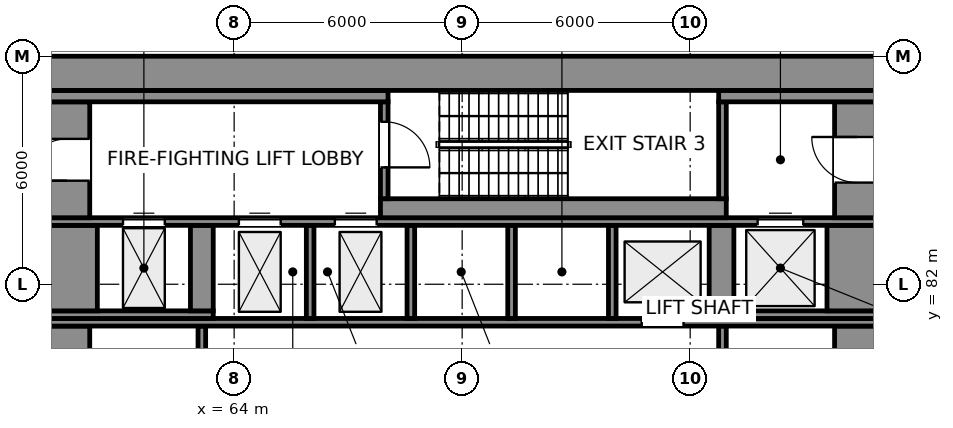
"""IFC4 building model, lengths in metres.
Left out: names, types, materials, properties, quantities, classifications, styles, units other than length and angle.
Written with IfcOpenShell. Run it as: python <this file> out.ifc"""

import sys

from ifc_helpers import new_model, si_unit, direction, frame, frame_2d, origin, place, context, subcontext, project, spatial, rectangle, extrude, element, fill, save


model = new_model("IFC4")
c1 = context("Model", 3, precision=1e-05, world=origin(), true_north=direction((0.0, 1.0)))
c2 = subcontext(c1, "Body", "Model", "MODEL_VIEW")
j1 = project(units=[si_unit("LENGTHUNIT", "METRE"), si_unit("PLANEANGLEUNIT", "RADIAN")], contexts=[c1])
p1 = place(None, origin())
s1 = spatial("IfcSite", under=j1, at=p1, CompositionType="ELEMENT")
p2 = place(p1, origin())
s2 = spatial("IfcBuilding", under=s1, at=p2, CompositionType="ELEMENT")
p3 = place(p2, frame((0.0, 0.0, 34.0)))
s3 = spatial("IfcBuildingStorey", under=s2, at=p3, CompositionType="ELEMENT", Elevation=34.0)
for number, where, z_axis, x_axis in (
    (1, (59.6, 72.2, 0.0), (0.0, 0.0, 1.0), (0.0, 1.0, 0.0)),
    (2, (80.4, 72.2, 0.0), (0.0, 0.0, 1.0), (0.0, 1.0, 0.0)),
):
    element("IfcWall", number, at=place(p3, frame(where, z_axis=z_axis, x_axis=x_axis)), inside=s3, PredefinedType="SHEAR", context=c2, shape_type="SweptSolid", body=[
        extrude(rectangle(XDim=8.7, YDim=1.2, at=frame_2d((4.35, 0.0))), origin(), (0.0, 0.0, 1.0), 5.0),
    ])
for number, where, z_axis, x_axis in (
    (3, (63.15, 77.7, 0.0), (0.0, 0.0, 1.0), (0.0, 1.0, 0.0)),
    (4, (76.85, 77.7, 0.0), (0.0, 0.0, 1.0), (0.0, 1.0, 0.0)),
):
    element("IfcWall", number, at=place(p3, frame(where, z_axis=z_axis, x_axis=x_axis)), inside=s3, PredefinedType="SHEAR", context=c2, shape_type="SweptSolid", body=[
        extrude(rectangle(XDim=3.2, YDim=0.2, at=frame_2d((1.6, 0.0))), origin(), (0.0, 0.0, 1.0), 5.0),
    ])
p4 = place(p3, frame((59.0, 81.0, 0.0), z_axis=(0.0, 0.0, 1.0), x_axis=(1.0, 0.0, 0.0)))
e5 = element("IfcWall", 5, at=p4, inside=s3, PredefinedType="SHEAR", context=c2, shape_type="SweptSolid", body=[
    extrude(rectangle(XDim=22.0, YDim=0.2, at=frame_2d((11.0, 0.0))), origin(), (0.0, 0.0, 1.0), 5.0),
])
p5 = place(p4, frame((15.725, 0.0, 0.0)))
e6 = element("IfcOpeningElement", 6, at=p5, cuts=e5, PredefinedType="OPENING", context=c2, shape_type="SweptSolid", body=[
    extrude(rectangle(XDim=1.1, YDim=2.1, at=frame_2d((0.55, 1.05))), frame((0.0, 0.11, 0.0), z_axis=(0.0, -1.0, 0.0), x_axis=(1.0, 0.0, 0.0)), (0.0, 0.0, 1.0), 0.22),
])
p6 = place(p3, frame((59.0, 81.2, 0.0), z_axis=(0.0, 0.0, 1.0), x_axis=(1.0, 0.0, 0.0)))
e7 = element("IfcWall", 7, at=p6, inside=s3, PredefinedType="SHEAR", context=c2, shape_type="SweptSolid", body=[
    extrude(rectangle(XDim=4.45, YDim=0.2, at=frame_2d((2.225, 0.0))), origin(), (0.0, 0.0, 1.0), 5.0),
])
for number, where, z_axis, x_axis in (
    (8, (66.0, 81.1, 0.0), (0.0, 0.0, 1.0), (0.0, 1.0, 0.0)),
    (9, (68.65, 81.1, 0.0), (0.0, 0.0, 1.0), (0.0, 1.0, 0.0)),
    (10, (71.3, 81.1, 0.0), (0.0, 0.0, 1.0), (0.0, 1.0, 0.0)),
    (11, (73.95, 81.1, 0.0), (0.0, 0.0, 1.0), (0.0, 1.0, 0.0)),
):
    element("IfcWall", number, at=place(p3, frame(where, z_axis=z_axis, x_axis=x_axis)), inside=s3, PredefinedType="SHEAR", context=c2, shape_type="SweptSolid", body=[
        extrude(rectangle(XDim=2.45, YDim=0.2, at=frame_2d((1.225, 0.0))), origin(), (0.0, 0.0, 1.0), 5.0),
    ])
p7 = place(p3, frame((76.5, 81.2, 0.0), z_axis=(0.0, 0.0, 1.0), x_axis=(1.0, 0.0, 0.0)))
e12 = element("IfcWall", 12, at=p7, inside=s3, PredefinedType="SHEAR", context=c2, shape_type="SweptSolid", body=[
    extrude(rectangle(XDim=4.5, YDim=0.2, at=frame_2d((2.25, 0.0))), origin(), (0.0, 0.0, 1.0), 5.0),
])
p8 = place(p3, frame((59.7, 81.3, 0.0), z_axis=(0.0, 0.0, 1.0), x_axis=(0.0, 1.0, 0.0)))
e13 = element("IfcWall", 13, at=p8, inside=s3, PredefinedType="SHEAR", context=c2, shape_type="SweptSolid", body=[
    extrude(rectangle(XDim=2.25, YDim=1.4, at=frame_2d((1.125, 0.0))), origin(), (0.0, 0.0, 1.0), 5.0),
])
p9 = place(p3, frame((63.15, 81.3, 0.0), z_axis=(0.0, 0.0, 1.0), x_axis=(0.0, 1.0, 0.0)))
e14 = element("IfcWall", 14, at=p9, inside=s3, PredefinedType="SHEAR", context=c2, shape_type="SweptSolid", body=[
    extrude(rectangle(XDim=2.25, YDim=0.6, at=frame_2d((1.125, 0.0))), origin(), (0.0, 0.0, 1.0), 5.0),
])
p10 = place(p3, frame((76.825, 81.3, 0.0), z_axis=(0.0, 0.0, 1.0), x_axis=(0.0, 1.0, 0.0)))
e15 = element("IfcWall", 15, at=p10, inside=s3, PredefinedType="SHEAR", context=c2, shape_type="SweptSolid", body=[
    extrude(rectangle(XDim=2.25, YDim=0.65, at=frame_2d((1.125, 0.0))), origin(), (0.0, 0.0, 1.0), 5.0),
])
p11 = place(p3, frame((80.3, 81.3, 0.0), z_axis=(0.0, 0.0, 1.0), x_axis=(0.0, 1.0, 0.0)))
e16 = element("IfcWall", 16, at=p11, inside=s3, PredefinedType="SHEAR", context=c2, shape_type="SweptSolid", body=[
    extrude(rectangle(XDim=2.25, YDim=1.4, at=frame_2d((1.125, 0.0))), origin(), (0.0, 0.0, 1.0), 5.0),
])
p12 = place(p3, frame((59.0, 83.65, 0.0), z_axis=(0.0, 0.0, 1.0), x_axis=(1.0, 0.0, 0.0)))
e17 = element("IfcWall", 17, at=p12, inside=s3, PredefinedType="SHEAR", context=c2, shape_type="SweptSolid", body=[
    extrude(rectangle(XDim=22.0, YDim=0.2, at=frame_2d((11.0, 0.0))), origin(), (0.0, 0.0, 1.0), 5.0),
])
p13 = place(p12, frame((5.125, 0.0, 0.0)))
e18 = element("IfcOpeningElement", 18, at=p13, cuts=e17, PredefinedType="OPENING", context=c2, shape_type="SweptSolid", body=[
    extrude(rectangle(XDim=1.1, YDim=2.1, at=frame_2d((0.55, 1.05))), frame((0.0, 0.11, 0.0), z_axis=(0.0, -1.0, 0.0), x_axis=(1.0, 0.0, 0.0)), (0.0, 0.0, 1.0), 0.22),
])
p14 = place(p12, frame((7.65, 0.0, 0.0)))
e19 = element("IfcOpeningElement", 19, at=p14, cuts=e17, PredefinedType="OPENING", context=c2, shape_type="SweptSolid", body=[
    extrude(rectangle(XDim=1.1, YDim=2.1, at=frame_2d((0.55, 1.05))), frame((0.0, 0.11, 0.0), z_axis=(0.0, -1.0, 0.0), x_axis=(1.0, 0.0, 0.0)), (0.0, 0.0, 1.0), 0.22),
])
p15 = place(p12, frame((18.775, 0.0, 0.0)))
e20 = element("IfcOpeningElement", 20, at=p15, cuts=e17, PredefinedType="OPENING", context=c2, shape_type="SweptSolid", body=[
    extrude(rectangle(XDim=1.2, YDim=2.1, at=frame_2d((0.6, 1.05))), frame((0.0, 0.11, 0.0), z_axis=(0.0, -1.0, 0.0), x_axis=(1.0, 0.0, 0.0)), (0.0, 0.0, 1.0), 0.22),
])
p16 = place(p12, frame((2.075, 0.0, 0.0)))
e21 = element("IfcOpeningElement", 21, at=p16, cuts=e17, PredefinedType="OPENING", context=c2, shape_type="SweptSolid", body=[
    extrude(rectangle(XDim=1.1, YDim=2.1, at=frame_2d((0.55, 1.05))), frame((0.0, 0.11, 0.0), z_axis=(0.0, -1.0, 0.0), x_axis=(1.0, 0.0, 0.0)), (0.0, 0.0, 1.0), 0.22),
])
p17 = place(p3, frame((59.6, 83.75, 0.0), z_axis=(0.0, 0.0, 1.0), x_axis=(0.0, 1.0, 0.0)))
e22 = element("IfcWall", 22, at=p17, inside=s3, PredefinedType="SHEAR", context=c2, shape_type="SweptSolid", body=[
    extrude(rectangle(XDim=3.05, YDim=1.2, at=frame_2d((1.525, 0.0))), origin(), (0.0, 0.0, 1.0), 5.0),
])
p18 = place(p17, frame((0.975, 0.0, 0.0)))
e23 = element("IfcOpeningElement", 23, at=p18, cuts=e22, PredefinedType="OPENING", context=c2, shape_type="SweptSolid", body=[
    extrude(rectangle(XDim=1.1, YDim=2.1, at=frame_2d((0.55, 1.05))), frame((0.0, 0.61, 0.0), z_axis=(0.0, -1.0, 0.0), x_axis=(1.0, 0.0, 0.0)), (0.0, 0.0, 1.0), 1.22),
])
p19 = place(p3, frame((67.85, 84.0, 0.0), z_axis=(0.0, 0.0, 1.0), x_axis=(1.0, 0.0, 0.0)))
e24 = element("IfcWall", 24, at=p19, inside=s3, PredefinedType="SHEAR", context=c2, shape_type="SweptSolid", body=[
    extrude(rectangle(XDim=9.1, YDim=0.5, at=frame_2d((4.55, 0.0))), origin(), (0.0, 0.0, 1.0), 5.0),
])
p20 = place(p3, frame((80.4, 83.75, 0.0), z_axis=(0.0, 0.0, 1.0), x_axis=(0.0, 1.0, 0.0)))
e25 = element("IfcWall", 25, at=p20, inside=s3, PredefinedType="SHEAR", context=c2, shape_type="SweptSolid", body=[
    extrude(rectangle(XDim=3.05, YDim=1.2, at=frame_2d((1.525, 0.0))), origin(), (0.0, 0.0, 1.0), 5.0),
])
p21 = place(p20, frame((0.925, 0.0, 0.0)))
e26 = element("IfcOpeningElement", 26, at=p21, cuts=e25, PredefinedType="OPENING", context=c2, shape_type="SweptSolid", body=[
    extrude(rectangle(XDim=1.2, YDim=2.1, at=frame_2d((0.6, 1.05))), frame((0.0, 0.61, 0.0), z_axis=(0.0, -1.0, 0.0), x_axis=(1.0, 0.0, 0.0)), (0.0, 0.0, 1.0), 1.22),
])
p22 = place(p3, frame((67.95, 84.25, 0.0), z_axis=(0.0, 0.0, 1.0), x_axis=(0.0, 1.0, 0.0)))
e27 = element("IfcWall", 27, at=p22, inside=s3, PredefinedType="SHEAR", context=c2, shape_type="SweptSolid", body=[
    extrude(rectangle(XDim=2.55, YDim=0.2, at=frame_2d((1.275, 0.0))), origin(), (0.0, 0.0, 1.0), 5.0),
])
p23 = place(p22, frame((0.825, 0.0, 0.0)))
e28 = element("IfcOpeningElement", 28, at=p23, cuts=e27, PredefinedType="OPENING", context=c2, shape_type="SweptSolid", body=[
    extrude(rectangle(XDim=1.2, YDim=2.1, at=frame_2d((0.6, 1.05))), frame((0.0, 0.11, 0.0), z_axis=(0.0, -1.0, 0.0), x_axis=(1.0, 0.0, 0.0)), (0.0, 0.0, 1.0), 0.22),
])
p24 = place(p3, frame((76.85, 84.25, 0.0), z_axis=(0.0, 0.0, 1.0), x_axis=(0.0, 1.0, 0.0)))
e29 = element("IfcWall", 29, at=p24, inside=s3, PredefinedType="SHEAR", context=c2, shape_type="SweptSolid", body=[
    extrude(rectangle(XDim=2.55, YDim=0.2, at=frame_2d((1.275, 0.0))), origin(), (0.0, 0.0, 1.0), 5.0),
])
p25 = place(p3, frame((59.0, 86.95, 0.0), z_axis=(0.0, 0.0, 1.0), x_axis=(1.0, 0.0, 0.0)))
e30 = element("IfcWall", 30, at=p25, inside=s3, PredefinedType="SHEAR", context=c2, shape_type="SweptSolid", body=[
    extrude(rectangle(XDim=9.05, YDim=0.3, at=frame_2d((4.525, 0.0))), origin(), (0.0, 0.0, 1.0), 5.0),
])
p26 = place(p3, frame((76.75, 86.95, 0.0), z_axis=(0.0, 0.0, 1.0), x_axis=(1.0, 0.0, 0.0)))
e31 = element("IfcWall", 31, at=p26, inside=s3, PredefinedType="SHEAR", context=c2, shape_type="SweptSolid", body=[
    extrude(rectangle(XDim=4.25, YDim=0.3, at=frame_2d((2.125, 0.0))), origin(), (0.0, 0.0, 1.0), 5.0),
])
p27 = place(p3, frame((59.0, 87.55, 0.0), z_axis=(0.0, 0.0, 1.0), x_axis=(1.0, 0.0, 0.0)))
e32 = element("IfcWall", 32, at=p27, inside=s3, PredefinedType="SHEAR", context=c2, shape_type="SweptSolid", body=[
    extrude(rectangle(XDim=22.0, YDim=0.9, at=frame_2d((11.0, 0.0))), origin(), (0.0, 0.0, 1.0), 5.0),
])
p28 = place(p23, frame((1.2, 0.0, 0.0), z_axis=(0.0, 0.0, 1.0), x_axis=(-1.0, 0.0, 0.0)))
e33 = element("IfcDoor", 33, at=p28, inside=s3, OperationType="SINGLE_SWING_RIGHT", PredefinedType="DOOR", context=c2, shape_type="SweptSolid", body=[
    extrude(rectangle(XDim=1.2, YDim=2.1, at=frame_2d((0.6, 1.05))), frame((0.0, 0.025, 0.0), z_axis=(0.0, -1.0, 0.0), x_axis=(1.0, 0.0, 0.0)), (0.0, 0.0, 1.0), 0.05),
])
fill(e28, e33)
p29 = place(p18, origin())
e34 = element("IfcDoor", 34, at=p29, inside=s3, OperationType="SINGLE_SWING_LEFT", PredefinedType="DOOR", context=c2, shape_type="SweptSolid", body=[
    extrude(rectangle(XDim=1.1, YDim=2.1, at=frame_2d((0.55, 1.05))), frame((0.0, 0.025, 0.0), z_axis=(0.0, -1.0, 0.0), x_axis=(1.0, 0.0, 0.0)), (0.0, 0.0, 1.0), 0.05),
])
fill(e23, e34)
p30 = place(p21, origin())
e35 = element("IfcDoor", 35, at=p30, inside=s3, OperationType="SINGLE_SWING_RIGHT", PredefinedType="DOOR", context=c2, shape_type="SweptSolid", body=[
    extrude(rectangle(XDim=1.2, YDim=2.1, at=frame_2d((0.6, 1.05))), frame((0.0, 0.025, 0.0), z_axis=(0.0, -1.0, 0.0), x_axis=(1.0, 0.0, 0.0)), (0.0, 0.0, 1.0), 0.05),
])
fill(e26, e35)
p31 = place(p13, origin())
e36 = element("IfcDoor", 36, at=p31, inside=s3, OperationType="DOUBLE_DOOR_SLIDING", PredefinedType="DOOR", context=c2, shape_type="SweptSolid", body=[
    extrude(rectangle(XDim=1.1, YDim=2.1, at=frame_2d((0.55, 1.05))), frame((0.0, 0.025, 0.0), z_axis=(0.0, -1.0, 0.0), x_axis=(1.0, 0.0, 0.0)), (0.0, 0.0, 1.0), 0.05),
])
fill(e18, e36)
p32 = place(p14, origin())
e37 = element("IfcDoor", 37, at=p32, inside=s3, OperationType="DOUBLE_DOOR_SLIDING", PredefinedType="DOOR", context=c2, shape_type="SweptSolid", body=[
    extrude(rectangle(XDim=1.1, YDim=2.1, at=frame_2d((0.55, 1.05))), frame((0.0, 0.025, 0.0), z_axis=(0.0, -1.0, 0.0), x_axis=(1.0, 0.0, 0.0)), (0.0, 0.0, 1.0), 0.05),
])
fill(e19, e37)
p33 = place(p5, origin())
e38 = element("IfcDoor", 38, at=p33, inside=s3, OperationType="DOUBLE_DOOR_SLIDING", PredefinedType="DOOR", context=c2, shape_type="SweptSolid", body=[
    extrude(rectangle(XDim=1.1, YDim=2.1, at=frame_2d((0.55, 1.05))), frame((0.0, 0.025, 0.0), z_axis=(0.0, -1.0, 0.0), x_axis=(1.0, 0.0, 0.0)), (0.0, 0.0, 1.0), 0.05),
])
fill(e6, e38)
p34 = place(p15, origin())
e39 = element("IfcDoor", 39, at=p34, inside=s3, OperationType="DOUBLE_DOOR_SLIDING", PredefinedType="DOOR", context=c2, shape_type="SweptSolid", body=[
    extrude(rectangle(XDim=1.2, YDim=2.1, at=frame_2d((0.6, 1.05))), frame((0.0, 0.025, 0.0), z_axis=(0.0, -1.0, 0.0), x_axis=(1.0, 0.0, 0.0)), (0.0, 0.0, 1.0), 0.05),
])
fill(e20, e39)
p35 = place(p16, origin())
e40 = element("IfcDoor", 40, at=p35, inside=s3, OperationType="DOUBLE_DOOR_SLIDING", PredefinedType="DOOR", context=c2, shape_type="SweptSolid", body=[
    extrude(rectangle(XDim=1.1, YDim=2.1, at=frame_2d((0.55, 1.05))), frame((0.0, 0.025, 0.0), z_axis=(0.0, -1.0, 0.0), x_axis=(1.0, 0.0, 0.0)), (0.0, 0.0, 1.0), 0.05),
])
fill(e21, e40)
save(model, sys.argv[1])
